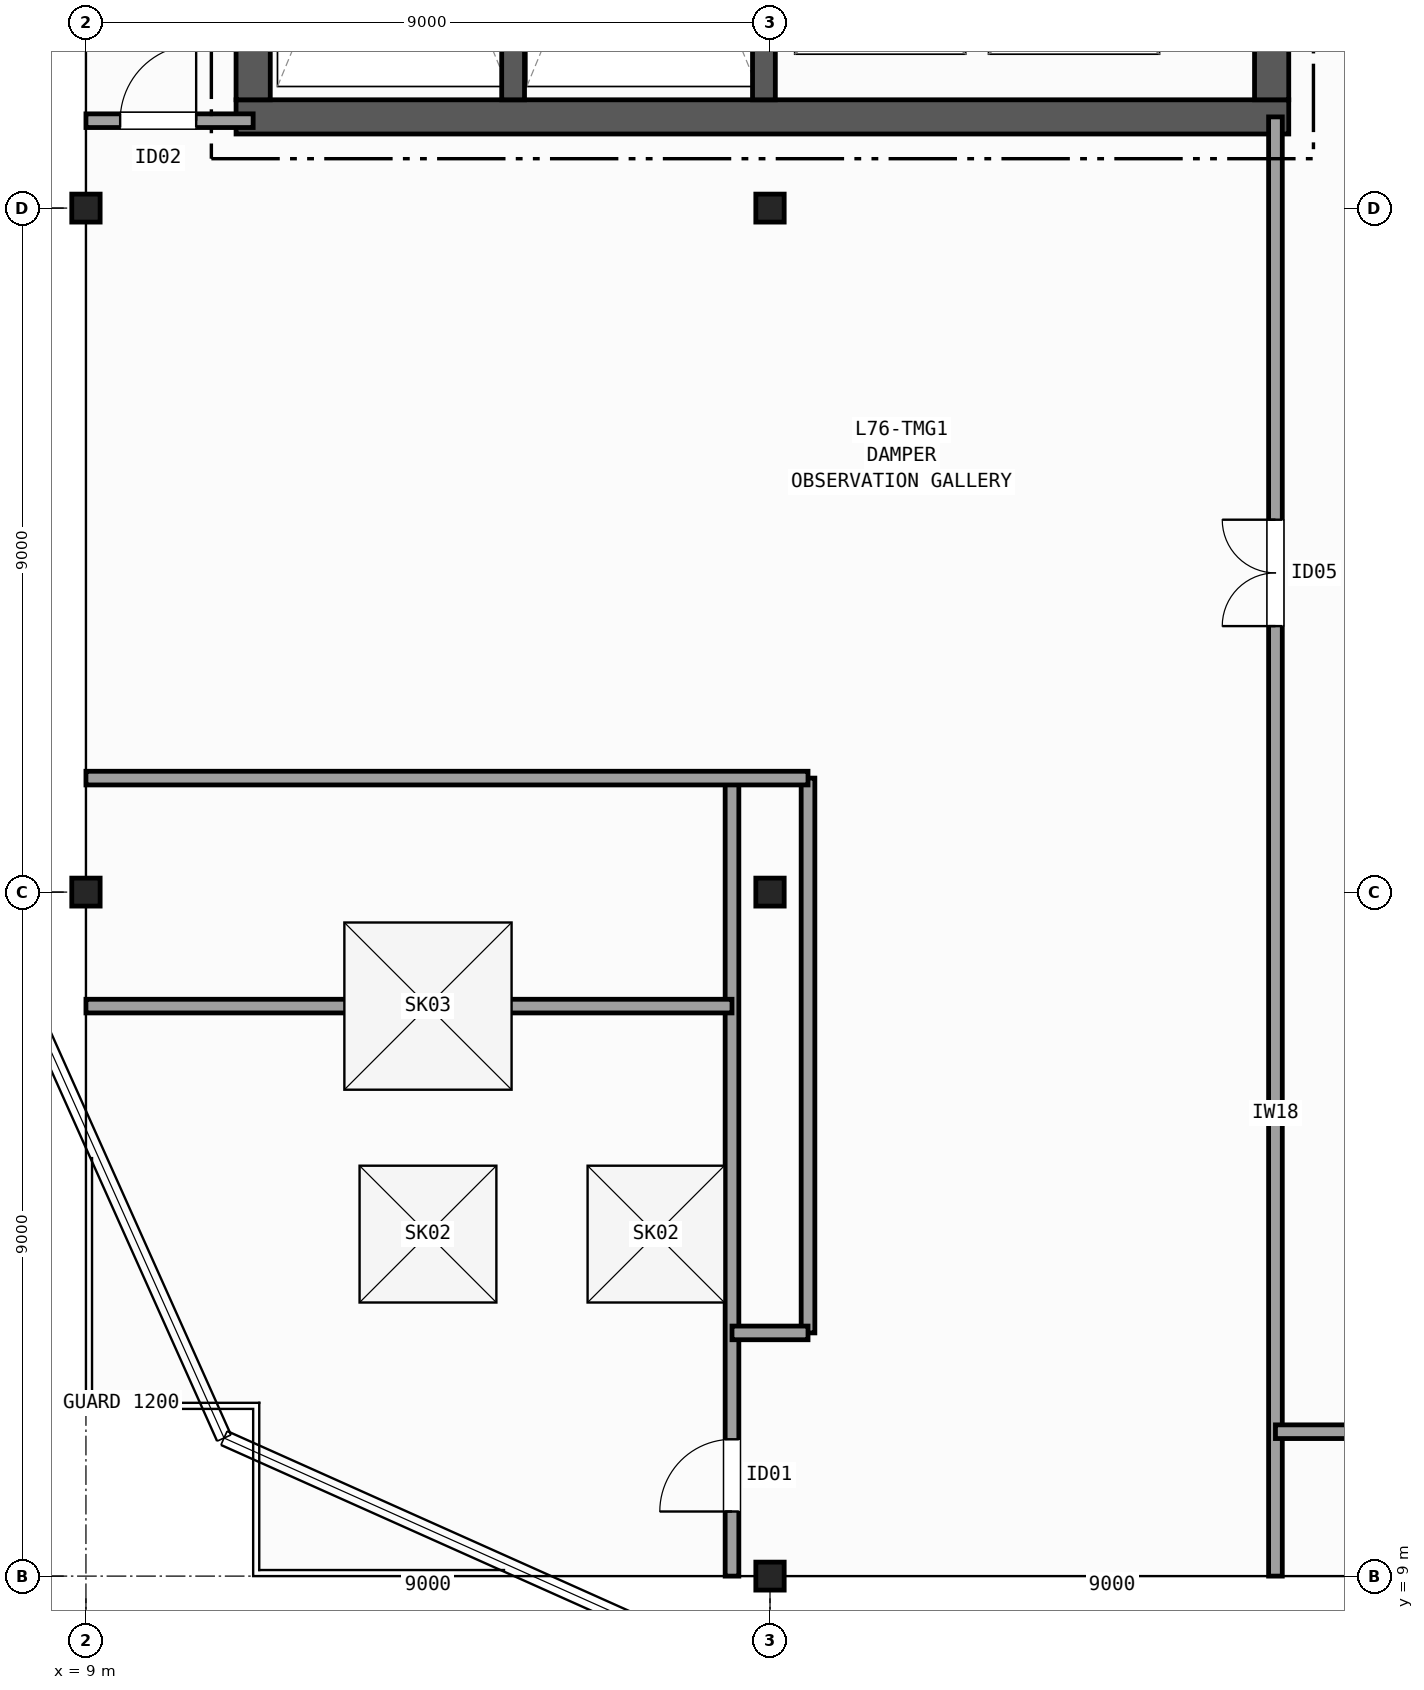
"""IFC4 building model, lengths in metres.
Left out: names, types, materials, properties, quantities, classifications, styles, units other than length and angle.
Written with IfcOpenShell. Run it as: python <this file> out.ifc"""

import sys

from ifc_helpers import new_model, si_unit, direction, frame, frame_2d, origin, origin_2d, place, context, subcontext, project, spatial, rectangle, i_section, extrude, element, fill, save


model = new_model("IFC4")
c1 = context("Model", 3, precision=1e-05, world=origin(), true_north=direction((0.0, 1.0)))
c2 = subcontext(c1, "Body", "Model", "MODEL_VIEW")
j1 = project(units=[si_unit("LENGTHUNIT", "METRE"), si_unit("PLANEANGLEUNIT", "RADIAN")], contexts=[c1])
p1 = place(None, origin())
s1 = spatial("IfcSite", under=j1, at=p1, CompositionType="ELEMENT")
p2 = place(p1, origin())
s2 = spatial("IfcBuilding", under=s1, at=p2, CompositionType="ELEMENT")
p3 = place(p2, frame((0.0, 0.0, 302.6)))
s3 = spatial("IfcBuildingStorey", under=s2, at=p3, CompositionType="ELEMENT", Elevation=302.6)
for number, where, z_axis, x_axis in (
    (1, (9.0, 18.0, 0.0), (0.0, 0.0, 1.0), (1.0, 0.0, 0.0)),
    (2, (9.0, 27.0, 0.0), (0.0, 0.0, 1.0), (1.0, 0.0, 0.0)),
    (3, (18.0, 9.0, 0.0), (0.0, 0.0, 1.0), (1.0, 0.0, 0.0)),
    (4, (18.0, 18.0, 0.0), (0.0, 0.0, 1.0), (1.0, 0.0, 0.0)),
    (5, (18.0, 27.0, 0.0), (0.0, 0.0, 1.0), (1.0, 0.0, 0.0)),
):
    element("IfcColumn", number, at=place(p3, frame(where, z_axis=z_axis, x_axis=x_axis)), inside=s3, PredefinedType="COLUMN", context=c2, shape_type="SweptSolid", body=[
        extrude(i_section(OverallWidth=0.373, OverallDepth=0.368, WebThickness=0.015, FlangeThickness=0.024, FilletRadius=0.015, at=origin_2d()), origin(), (0.0, 0.0, 1.0), 5.2),
    ])
p4 = place(p3, frame((10.975, 28.2, 0.0), z_axis=(0.0, 0.0, 1.0), x_axis=(1.0, 0.0, 0.0)))
e6 = element("IfcWall", 6, at=p4, inside=s3, PredefinedType="SHEAR", context=c2, shape_type="SweptSolid", body=[
    extrude(rectangle(XDim=13.85, YDim=0.45, at=frame_2d((6.925, 0.0))), origin(), (0.0, 0.0, 1.0), 4.9),
])
p5 = place(p3, frame((11.2, 42.175, 0.0), z_axis=(0.0, 0.0, 1.0), x_axis=(0.0, -1.0, 0.0)))
e7 = element("IfcWall", 7, at=p5, inside=s3, PredefinedType="SHEAR", context=c2, shape_type="SweptSolid", body=[
    extrude(rectangle(XDim=13.75, YDim=0.45, at=frame_2d((6.875, 0.0))), origin(), (0.0, 0.0, 1.0), 4.9),
])
p6 = place(p3, frame((24.6, 28.425, 0.0), z_axis=(0.0, 0.0, 1.0), x_axis=(0.0, 1.0, 0.0)))
e8 = element("IfcWall", 8, at=p6, inside=s3, PredefinedType="SHEAR", context=c2, shape_type="SweptSolid", body=[
    extrude(rectangle(XDim=13.75, YDim=0.45, at=frame_2d((6.875, 0.0))), origin(), (0.0, 0.0, 1.0), 4.9),
])
p7 = place(p6, frame((3.375, 0.0, 0.0)))
e9 = element("IfcOpeningElement", 9, at=p7, cuts=e8, PredefinedType="OPENING", context=c2, shape_type="SweptSolid", body=[
    extrude(rectangle(XDim=1.5, YDim=2.2, at=frame_2d((0.75, 1.1))), frame((0.0, 0.235, 0.0), z_axis=(0.0, -1.0, 0.0), x_axis=(1.0, 0.0, 0.0)), (0.0, 0.0, 1.0), 0.47),
])
p8 = place(p6, frame((9.975, 0.0, 0.0)))
e10 = element("IfcOpeningElement", 10, at=p8, cuts=e8, PredefinedType="OPENING", context=c2, shape_type="SweptSolid", body=[
    extrude(rectangle(XDim=0.9, YDim=2.1, at=frame_2d((0.45, 1.05))), frame((0.0, 0.235, 0.0), z_axis=(0.0, -1.0, 0.0), x_axis=(1.0, 0.0, 0.0)), (0.0, 0.0, 1.0), 0.47),
])
p9 = place(p3, frame((14.62, 28.425, 0.0), z_axis=(0.0, 0.0, 1.0), x_axis=(0.0, 1.0, 0.0)))
e11 = element("IfcWall", 11, at=p9, inside=s3, PredefinedType="SHEAR", context=c2, shape_type="SweptSolid", body=[
    extrude(rectangle(XDim=9.025, YDim=0.3, at=frame_2d((4.512, 0.0))), origin(), (0.0, 0.0, 1.0), 4.9),
])
p10 = place(p3, frame((17.92, 42.175, 0.0), z_axis=(0.0, 0.0, 1.0), x_axis=(0.0, -1.0, 0.0)))
e12 = element("IfcWall", 12, at=p10, inside=s3, PredefinedType="SHEAR", context=c2, shape_type="SweptSolid", body=[
    extrude(rectangle(XDim=13.75, YDim=0.3, at=frame_2d((6.875, 0.0))), origin(), (0.0, 0.0, 1.0), 4.9),
])
p11 = place(p10, frame((2.0, 0.0, 0.0)))
e13 = element("IfcOpeningElement", 13, at=p11, cuts=e12, PredefinedType="OPENING", context=c2, shape_type="SweptSolid", body=[
    extrude(rectangle(XDim=1.15, YDim=2.15, at=frame_2d((0.575, 1.075))), frame((0.0, 0.16, 0.0), z_axis=(0.0, -1.0, 0.0), x_axis=(1.0, 0.0, 0.0)), (0.0, 0.0, 1.0), 0.32),
])
p12 = place(p3, frame((24.65, 9.0, 0.0), z_axis=(0.0, 0.0, 1.0), x_axis=(0.0, 1.0, 0.0)))
e14 = element("IfcWall", 14, at=p12, inside=s3, PredefinedType="PARTITIONING", context=c2, shape_type="SweptSolid", body=[
    extrude(rectangle(XDim=19.2, YDim=0.18, at=frame_2d((9.6, 0.0))), origin(), (0.0, 0.0, 1.0), 4.187),
])
p13 = place(p12, frame((12.5, 0.0, 0.0)))
e15 = element("IfcOpeningElement", 15, at=p13, cuts=e14, PredefinedType="OPENING", context=c2, shape_type="SweptSolid", body=[
    extrude(rectangle(XDim=1.4, YDim=2.15, at=frame_2d((0.7, 1.075))), frame((0.0, 0.1, 0.0), z_axis=(0.0, -1.0, 0.0), x_axis=(1.0, 0.0, 0.0)), (0.0, 0.0, 1.0), 0.2),
])
p14 = place(p3, frame((17.5, 9.0, 0.0), z_axis=(0.0, 0.0, 1.0), x_axis=(0.0, 1.0, 0.0)))
e16 = element("IfcWall", 16, at=p14, inside=s3, PredefinedType="PARTITIONING", context=c2, shape_type="SweptSolid", body=[
    extrude(rectangle(XDim=10.5, YDim=0.18, at=frame_2d((5.25, 0.0))), origin(), (0.0, 0.0, 1.0), 4.269),
])
p15 = place(p14, frame((0.85, 0.0, 0.0)))
e17 = element("IfcOpeningElement", 17, at=p15, cuts=e16, PredefinedType="OPENING", context=c2, shape_type="SweptSolid", body=[
    extrude(rectangle(XDim=0.95, YDim=2.1, at=frame_2d((0.475, 1.05))), frame((0.0, 0.1, 0.0), z_axis=(0.0, -1.0, 0.0), x_axis=(1.0, 0.0, 0.0)), (0.0, 0.0, 1.0), 0.2),
])
p16 = place(p3, frame((18.5, 12.2, 0.0), z_axis=(0.0, 0.0, 1.0), x_axis=(0.0, 1.0, 0.0)))
e18 = element("IfcWall", 18, at=p16, inside=s3, PredefinedType="PARTITIONING", context=c2, shape_type="SweptSolid", body=[
    extrude(rectangle(XDim=7.3, YDim=0.18, at=frame_2d((3.65, 0.0))), origin(), (0.0, 0.0, 1.0), 4.269),
])
p17 = place(p3, frame((17.5, 12.2, 0.0), z_axis=(0.0, 0.0, 1.0), x_axis=(1.0, 0.0, 0.0)))
e19 = element("IfcWall", 19, at=p17, inside=s3, PredefinedType="PARTITIONING", context=c2, shape_type="SweptSolid", body=[
    extrude(rectangle(XDim=1.0, YDim=0.18, at=frame_2d((0.5, 0.0))), origin(), (0.0, 0.0, 1.0), 4.272),
])
p18 = place(p3, frame((9.0, 16.5, 0.0), z_axis=(0.0, 0.0, 1.0), x_axis=(1.0, 0.0, 0.0)))
e20 = element("IfcWall", 20, at=p18, inside=s3, PredefinedType="PARTITIONING", context=c2, shape_type="SweptSolid", body=[
    extrude(rectangle(XDim=8.5, YDim=0.18, at=frame_2d((4.25, 0.0))), origin(), (0.0, 0.0, 1.0), 4.9),
])
p19 = place(p3, frame((9.0, 19.5, 0.0), z_axis=(0.0, 0.0, 1.0), x_axis=(1.0, 0.0, 0.0)))
e21 = element("IfcWall", 21, at=p19, inside=s3, PredefinedType="PARTITIONING", context=c2, shape_type="SweptSolid", body=[
    extrude(rectangle(XDim=9.5, YDim=0.18, at=frame_2d((4.75, 0.0))), origin(), (0.0, 0.0, 1.0), 4.187),
])
p20 = place(p3, frame((9.0, 28.15, 0.0), z_axis=(0.0, 0.0, 1.0), x_axis=(1.0, 0.0, 0.0)))
e22 = element("IfcWall", 22, at=p20, inside=s3, PredefinedType="PARTITIONING", context=c2, shape_type="SweptSolid", body=[
    extrude(rectangle(XDim=2.2, YDim=0.18, at=frame_2d((1.1, 0.0))), origin(), (0.0, 0.0, 1.0), 4.187),
])
p21 = place(p20, frame((0.45, 0.0, 0.0)))
e23 = element("IfcOpeningElement", 23, at=p21, cuts=e22, PredefinedType="OPENING", context=c2, shape_type="SweptSolid", body=[
    extrude(rectangle(XDim=1.0, YDim=2.1, at=frame_2d((0.5, 1.05))), frame((0.0, 0.1, 0.0), z_axis=(0.0, -1.0, 0.0), x_axis=(1.0, 0.0, 0.0)), (0.0, 0.0, 1.0), 0.2),
])
p22 = place(p3, frame((24.65, 10.9, 0.0), z_axis=(0.0, 0.0, 1.0), x_axis=(1.0, 0.0, 0.0)))
e24 = element("IfcWall", 24, at=p22, inside=s3, PredefinedType="PARTITIONING", context=c2, shape_type="SweptSolid", body=[
    extrude(rectangle(XDim=20.35, YDim=0.18, at=frame_2d((10.175, 0.0))), origin(), (0.0, 0.0, 1.0), 4.269),
])
p23 = place(p22, frame((1.8, 0.0, 0.0)))
e25 = element("IfcOpeningElement", 25, at=p23, cuts=e24, PredefinedType="OPENING", context=c2, shape_type="SweptSolid", body=[
    extrude(rectangle(XDim=1.05, YDim=2.15, at=frame_2d((0.525, 1.075))), frame((0.0, 0.1, 0.0), z_axis=(0.0, -1.0, 0.0), x_axis=(1.0, 0.0, 0.0)), (0.0, 0.0, 1.0), 0.2),
])
p24 = place(p2, frame((0.0, 0.0, 307.8)))
p25 = place(p24, frame((0.0, 0.0, -0.3)))
p26 = place(p25, frame((13.5, 13.5, 0.0)))
p27 = place(p26, frame((0.0, 0.0, 0.25)))
e26 = element("IfcWindow", 26, at=p27, inside=s3, PartitioningType="SINGLE_PANEL", PredefinedType="SKYLIGHT", context=c2, shape_type="SweptSolid", body=[
    extrude(rectangle(XDim=1.8, YDim=1.8, at=origin_2d()), origin(), (0.0, 0.0, 1.0), 0.05),
])
p28 = place(p25, frame((16.5, 13.5, 0.0)))
p29 = place(p28, frame((0.0, 0.0, 0.25)))
e27 = element("IfcWindow", 27, at=p29, inside=s3, PartitioningType="SINGLE_PANEL", PredefinedType="SKYLIGHT", context=c2, shape_type="SweptSolid", body=[
    extrude(rectangle(XDim=1.8, YDim=1.8, at=origin_2d()), origin(), (0.0, 0.0, 1.0), 0.05),
])
p30 = place(p25, frame((13.5, 16.5, 0.0)))
p31 = place(p30, frame((0.0, 0.0, 0.25)))
e28 = element("IfcWindow", 28, at=p31, inside=s3, PartitioningType="SINGLE_PANEL", PredefinedType="SKYLIGHT", context=c2, shape_type="SweptSolid", body=[
    extrude(rectangle(XDim=2.2, YDim=2.2, at=origin_2d()), origin(), (0.0, 0.0, 1.0), 0.05),
])
p32 = place(p13, origin())
e29 = element("IfcDoor", 29, at=p32, inside=s3, OperationType="DOUBLE_DOOR_SINGLE_SWING", PredefinedType="DOOR", context=c2, shape_type="SweptSolid", body=[
    extrude(rectangle(XDim=1.4, YDim=2.15, at=frame_2d((0.7, 1.075))), frame((0.0, 0.025, 0.0), z_axis=(0.0, -1.0, 0.0), x_axis=(1.0, 0.0, 0.0)), (0.0, 0.0, 1.0), 0.05),
])
fill(e15, e29)
p33 = place(p15, origin())
e30 = element("IfcDoor", 30, at=p33, inside=s3, OperationType="SINGLE_SWING_LEFT", PredefinedType="DOOR", context=c2, shape_type="SweptSolid", body=[
    extrude(rectangle(XDim=0.95, YDim=2.1, at=frame_2d((0.475, 1.05))), frame((0.0, 0.025, 0.0), z_axis=(0.0, -1.0, 0.0), x_axis=(1.0, 0.0, 0.0)), (0.0, 0.0, 1.0), 0.05),
])
fill(e17, e30)
p34 = place(p21, origin())
e31 = element("IfcDoor", 31, at=p34, inside=s3, OperationType="SINGLE_SWING_RIGHT", PredefinedType="DOOR", context=c2, shape_type="SweptSolid", body=[
    extrude(rectangle(XDim=1.0, YDim=2.1, at=frame_2d((0.5, 1.05))), frame((0.0, 0.025, 0.0), z_axis=(0.0, -1.0, 0.0), x_axis=(1.0, 0.0, 0.0)), (0.0, 0.0, 1.0), 0.05),
])
fill(e23, e31)
save(model, sys.argv[1])
